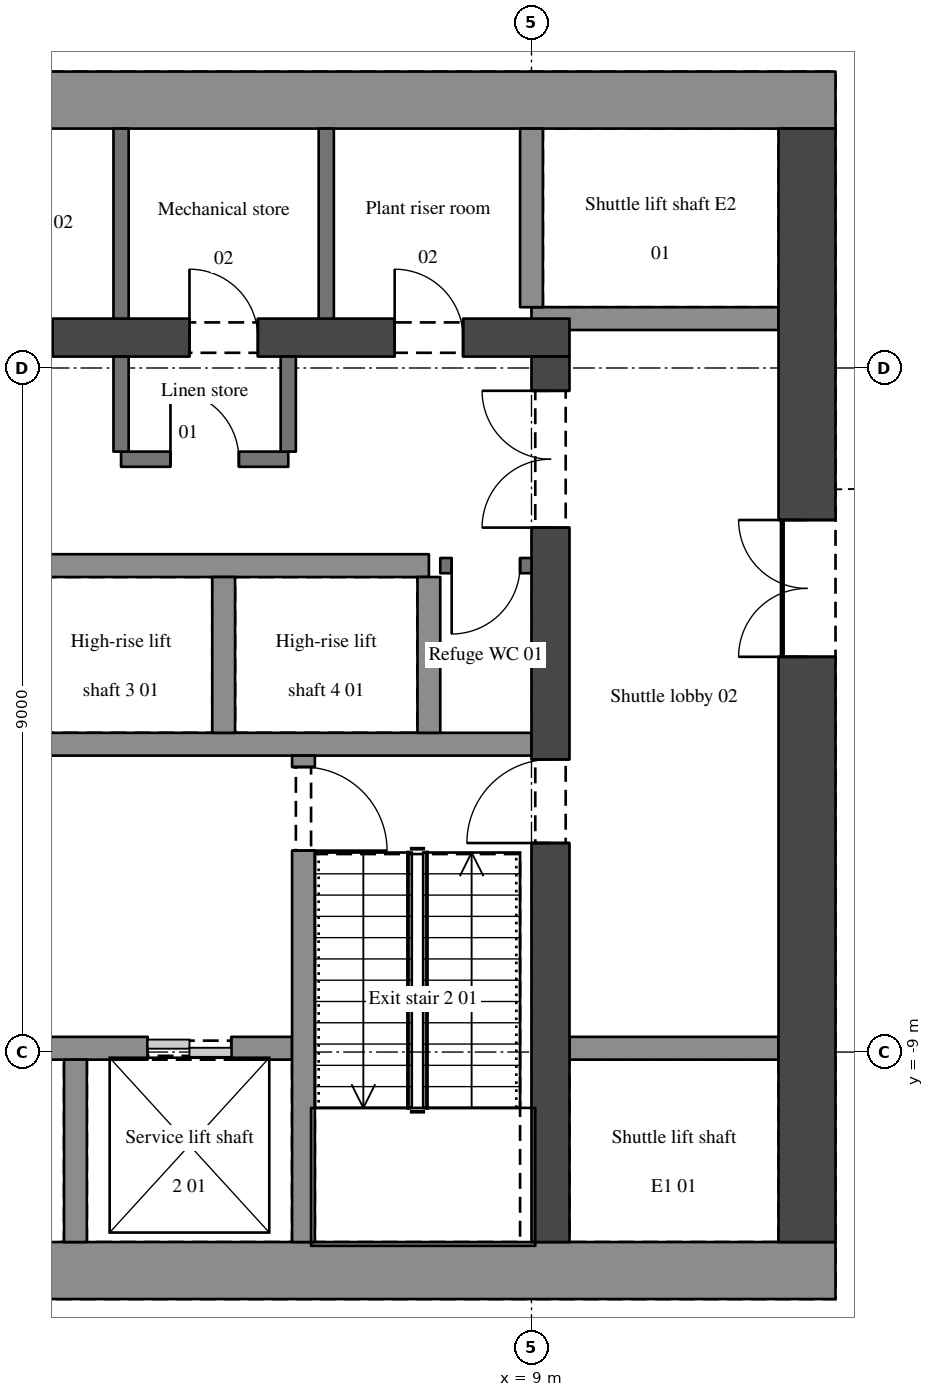
"""IFC4 building model, lengths in metres.
Left out: names, types, materials, properties, quantities, classifications, styles, units other than length and angle.
Written with IfcOpenShell. Run it as: python <this file> out.ifc"""

import sys

from ifc_helpers import new_model, si_unit, direction, frame, frame_2d, origin, place, context, subcontext, project, spatial, rectangle, extrude, element, fill, save


model = new_model("IFC4")
c1 = context("Model", 3, precision=1e-05, world=origin(), true_north=direction((0.0, 1.0)))
c2 = subcontext(c1, "Body", "Model", "MODEL_VIEW")
j1 = project(units=[si_unit("LENGTHUNIT", "METRE"), si_unit("PLANEANGLEUNIT", "RADIAN")], contexts=[c1])
p1 = place(None, origin())
s1 = spatial("IfcSite", under=j1, at=p1, CompositionType="ELEMENT")
p2 = place(p1, origin())
s2 = spatial("IfcBuilding", under=s1, at=p2, CompositionType="ELEMENT")
p3 = place(p2, frame((0.0, 0.0, 167.7)))
s3 = spatial("IfcBuildingStorey", under=s2, at=p3, CompositionType="ELEMENT", Elevation=167.7)
for number, where, z_axis, x_axis in (
    (1, (-13.0, -11.875, 0.0), (0.0, 0.0, 1.0), (1.0, 0.0, 0.0)),
    (2, (-13.0, 3.525, 0.0), (0.0, 0.0, 1.0), (1.0, 0.0, 0.0)),
):
    element("IfcWall", number, at=place(p3, frame(where, z_axis=z_axis, x_axis=x_axis)), inside=s3, PredefinedType="SHEAR", context=c2, shape_type="SweptSolid", body=[
        extrude(rectangle(XDim=26.0, YDim=0.75, at=frame_2d((13.0, 0.0))), origin(), (0.0, 0.0, 1.0), 4.5),
    ])
p4 = place(p3, frame((12.625, -11.5, 0.0), z_axis=(0.0, 0.0, 1.0), x_axis=(0.0, 1.0, 0.0)))
e3 = element("IfcWall", 3, at=p4, inside=s3, PredefinedType="SHEAR", context=c2, shape_type="SweptSolid", body=[
    extrude(rectangle(XDim=14.65, YDim=0.75, at=frame_2d((7.325, 0.0))), origin(), (0.0, 0.0, 1.0), 4.5),
])
p5 = place(p4, frame((7.7, 0.0, 0.0)))
e4 = element("IfcOpeningElement", 4, at=p5, cuts=e3, PredefinedType="OPENING", context=c2, shape_type="SweptSolid", body=[
    extrude(rectangle(XDim=1.8, YDim=2.1, at=frame_2d((0.9, 1.05))), frame((0.0, 0.385, 0.0), z_axis=(0.0, -1.0, 0.0), x_axis=(1.0, 0.0, 0.0)), (0.0, 0.0, 1.0), 0.77),
])
p6 = place(p3, frame((-9.5, 0.4, 0.0), z_axis=(0.0, 0.0, 1.0), x_axis=(1.0, 0.0, 0.0)))
e5 = element("IfcWall", 5, at=p6, inside=s3, PredefinedType="SHEAR", context=c2, shape_type="SweptSolid", body=[
    extrude(rectangle(XDim=19.0, YDim=0.5, at=frame_2d((9.5, 0.0))), origin(), (0.0, 0.0, 1.0), 4.5),
])
p7 = place(p6, frame((1.4, 0.0, 0.0)))
e6 = element("IfcOpeningElement", 6, at=p7, cuts=e5, PredefinedType="OPENING", context=c2, shape_type="SweptSolid", body=[
    extrude(rectangle(XDim=0.9, YDim=2.1, at=frame_2d((0.45, 1.05))), frame((0.0, 0.26, 0.0), z_axis=(0.0, -1.0, 0.0), x_axis=(1.0, 0.0, 0.0)), (0.0, 0.0, 1.0), 0.52),
])
p8 = place(p6, frame((4.1, 0.0, 0.0)))
e7 = element("IfcOpeningElement", 7, at=p8, cuts=e5, PredefinedType="OPENING", context=c2, shape_type="SweptSolid", body=[
    extrude(rectangle(XDim=0.9, YDim=2.1, at=frame_2d((0.45, 1.05))), frame((0.0, 0.26, 0.0), z_axis=(0.0, -1.0, 0.0), x_axis=(1.0, 0.0, 0.0)), (0.0, 0.0, 1.0), 0.52),
])
p9 = place(p6, frame((6.8, 0.0, 0.0)))
e8 = element("IfcOpeningElement", 8, at=p9, cuts=e5, PredefinedType="OPENING", context=c2, shape_type="SweptSolid", body=[
    extrude(rectangle(XDim=0.9, YDim=2.1, at=frame_2d((0.45, 1.05))), frame((0.0, 0.26, 0.0), z_axis=(0.0, -1.0, 0.0), x_axis=(1.0, 0.0, 0.0)), (0.0, 0.0, 1.0), 0.52),
])
p10 = place(p6, frame((11.3, 0.0, 0.0)))
e9 = element("IfcOpeningElement", 9, at=p10, cuts=e5, PredefinedType="OPENING", context=c2, shape_type="SweptSolid", body=[
    extrude(rectangle(XDim=0.9, YDim=2.1, at=frame_2d((0.45, 1.05))), frame((0.0, 0.26, 0.0), z_axis=(0.0, -1.0, 0.0), x_axis=(1.0, 0.0, 0.0)), (0.0, 0.0, 1.0), 0.52),
])
p11 = place(p6, frame((14.0, 0.0, 0.0)))
e10 = element("IfcOpeningElement", 10, at=p11, cuts=e5, PredefinedType="OPENING", context=c2, shape_type="SweptSolid", body=[
    extrude(rectangle(XDim=0.9, YDim=2.1, at=frame_2d((0.45, 1.05))), frame((0.0, 0.26, 0.0), z_axis=(0.0, -1.0, 0.0), x_axis=(1.0, 0.0, 0.0)), (0.0, 0.0, 1.0), 0.52),
])
p12 = place(p6, frame((16.7, 0.0, 0.0)))
e11 = element("IfcOpeningElement", 11, at=p12, cuts=e5, PredefinedType="OPENING", context=c2, shape_type="SweptSolid", body=[
    extrude(rectangle(XDim=0.9, YDim=2.1, at=frame_2d((0.45, 1.05))), frame((0.0, 0.26, 0.0), z_axis=(0.0, -1.0, 0.0), x_axis=(1.0, 0.0, 0.0)), (0.0, 0.0, 1.0), 0.52),
])
p13 = place(p6, frame((9.05, 0.0, 0.0)))
e12 = element("IfcOpeningElement", 12, at=p13, cuts=e5, PredefinedType="OPENING", context=c2, shape_type="SweptSolid", body=[
    extrude(rectangle(XDim=0.9, YDim=2.1, at=frame_2d((0.45, 1.05))), frame((0.0, 0.26, 0.0), z_axis=(0.0, -1.0, 0.0), x_axis=(1.0, 0.0, 0.0)), (0.0, 0.0, 1.0), 0.52),
])
p14 = place(p3, frame((9.25, -11.5, 0.0), z_axis=(0.0, 0.0, 1.0), x_axis=(0.0, 1.0, 0.0)))
e13 = element("IfcWall", 13, at=p14, inside=s3, PredefinedType="SHEAR", context=c2, shape_type="SweptSolid", body=[
    extrude(rectangle(XDim=11.65, YDim=0.5, at=frame_2d((5.825, 0.0))), origin(), (0.0, 0.0, 1.0), 4.5),
])
p15 = place(p14, frame((9.4, 0.0, 0.0)))
e14 = element("IfcOpeningElement", 14, at=p15, cuts=e13, PredefinedType="OPENING", context=c2, shape_type="SweptSolid", body=[
    extrude(rectangle(XDim=1.8, YDim=2.1, at=frame_2d((0.9, 1.05))), frame((0.0, 0.26, 0.0), z_axis=(0.0, -1.0, 0.0), x_axis=(1.0, 0.0, 0.0)), (0.0, 0.0, 1.0), 0.52),
])
p16 = place(p14, frame((5.25, 0.0, 0.0)))
e15 = element("IfcOpeningElement", 15, at=p16, cuts=e13, PredefinedType="OPENING", context=c2, shape_type="SweptSolid", body=[
    extrude(rectangle(XDim=1.1, YDim=2.1, at=frame_2d((0.55, 1.05))), frame((0.0, 0.26, 0.0), z_axis=(0.0, -1.0, 0.0), x_axis=(1.0, 0.0, 0.0)), (0.0, 0.0, 1.0), 0.52),
])
p17 = place(p3, frame((-5.85, -8.95, 0.0), z_axis=(0.0, 0.0, 1.0), x_axis=(1.0, 0.0, 0.0)))
e16 = element("IfcWall", 16, at=p17, inside=s3, PredefinedType="SHEAR", context=c2, shape_type="SweptSolid", body=[
    extrude(rectangle(XDim=11.7, YDim=0.3, at=frame_2d((5.85, 0.0))), origin(), (0.0, 0.0, 1.0), 4.5),
])
p18 = place(p17, frame((0.8, 0.0, 0.0)))
e17 = element("IfcOpeningElement", 17, at=p18, cuts=e16, PredefinedType="OPENING", context=c2, shape_type="SweptSolid", body=[
    extrude(rectangle(XDim=1.1, YDim=2.1, at=frame_2d((0.55, 1.05))), frame((0.0, 0.16, 0.0), z_axis=(0.0, -1.0, 0.0), x_axis=(1.0, 0.0, 0.0)), (0.0, 0.0, 1.0), 0.32),
])
p19 = place(p17, frame((3.8, 0.0, 0.0)))
e18 = element("IfcOpeningElement", 18, at=p19, cuts=e16, PredefinedType="OPENING", context=c2, shape_type="SweptSolid", body=[
    extrude(rectangle(XDim=1.1, YDim=2.1, at=frame_2d((0.55, 1.05))), frame((0.0, 0.16, 0.0), z_axis=(0.0, -1.0, 0.0), x_axis=(1.0, 0.0, 0.0)), (0.0, 0.0, 1.0), 0.32),
])
p20 = place(p17, frame((6.8, 0.0, 0.0)))
e19 = element("IfcOpeningElement", 19, at=p20, cuts=e16, PredefinedType="OPENING", context=c2, shape_type="SweptSolid", body=[
    extrude(rectangle(XDim=1.1, YDim=2.1, at=frame_2d((0.55, 1.05))), frame((0.0, 0.16, 0.0), z_axis=(0.0, -1.0, 0.0), x_axis=(1.0, 0.0, 0.0)), (0.0, 0.0, 1.0), 0.32),
])
p21 = place(p17, frame((9.8, 0.0, 0.0)))
e20 = element("IfcOpeningElement", 20, at=p21, cuts=e16, PredefinedType="OPENING", context=c2, shape_type="SweptSolid", body=[
    extrude(rectangle(XDim=1.1, YDim=2.1, at=frame_2d((0.55, 1.05))), frame((0.0, 0.16, 0.0), z_axis=(0.0, -1.0, 0.0), x_axis=(1.0, 0.0, 0.0)), (0.0, 0.0, 1.0), 0.32),
])
p22 = place(p3, frame((9.5, -8.95, 0.0), z_axis=(0.0, 0.0, 1.0), x_axis=(1.0, 0.0, 0.0)))
e21 = element("IfcWall", 21, at=p22, inside=s3, PredefinedType="SHEAR", context=c2, shape_type="SweptSolid", body=[
    extrude(rectangle(XDim=2.75, YDim=0.3, at=frame_2d((1.375, 0.0))), origin(), (0.0, 0.0, 1.0), 4.5),
])
p23 = place(p3, frame((2.25, -4.95, 0.0), z_axis=(0.0, 0.0, 1.0), x_axis=(1.0, 0.0, 0.0)))
e22 = element("IfcWall", 22, at=p23, inside=s3, PredefinedType="SHEAR", context=c2, shape_type="SweptSolid", body=[
    extrude(rectangle(XDim=6.75, YDim=0.3, at=frame_2d((3.375, 0.0))), origin(), (0.0, 0.0, 1.0), 4.5),
])
p24 = place(p3, frame((2.25, -2.6, 0.0), z_axis=(0.0, 0.0, 1.0), x_axis=(1.0, 0.0, 0.0)))
e23 = element("IfcWall", 23, at=p24, inside=s3, PredefinedType="SHEAR", context=c2, shape_type="SweptSolid", body=[
    extrude(rectangle(XDim=5.4, YDim=0.3, at=frame_2d((2.7, 0.0))), origin(), (0.0, 0.0, 1.0), 4.5),
])
p25 = place(p3, frame((9.0, -2.6, 0.0), z_axis=(0.0, 0.0, 1.0), x_axis=(-1.0, 0.0, 0.0)))
e24 = element("IfcWall", 24, at=p25, inside=s3, PredefinedType="SOLIDWALL", context=c2, shape_type="SweptSolid", body=[
    extrude(rectangle(XDim=1.2, YDim=0.2, at=frame_2d((0.6, 0.0))), origin(), (0.0, 0.0, 1.0), 4.2),
])
p26 = place(p25, frame((0.15, 0.0, 0.0)))
e25 = element("IfcOpeningElement", 25, at=p26, cuts=e24, PredefinedType="OPENING", context=c2, shape_type="SweptSolid", body=[
    extrude(rectangle(XDim=0.9, YDim=2.1, at=frame_2d((0.45, 1.05))), frame((0.0, 0.11, 0.0), z_axis=(0.0, -1.0, 0.0), x_axis=(1.0, 0.0, 0.0)), (0.0, 0.0, 1.0), 0.22),
])
p27 = place(p3, frame((3.6, -1.2, 0.0), z_axis=(0.0, 0.0, 1.0), x_axis=(1.0, 0.0, 0.0)))
e26 = element("IfcWall", 26, at=p27, inside=s3, PredefinedType="SOLIDWALL", context=c2, shape_type="SweptSolid", body=[
    extrude(rectangle(XDim=2.2, YDim=0.2, at=frame_2d((1.1, 0.0))), origin(), (0.0, 0.0, 1.0), 4.2),
])
p28 = place(p27, frame((0.65, 0.0, 0.0)))
e27 = element("IfcOpeningElement", 27, at=p28, cuts=e26, PredefinedType="OPENING", context=c2, shape_type="SweptSolid", body=[
    extrude(rectangle(XDim=0.9, YDim=2.1, at=frame_2d((0.45, 1.05))), frame((0.0, 0.11, 0.0), z_axis=(0.0, -1.0, 0.0), x_axis=(1.0, 0.0, 0.0)), (0.0, 0.0, 1.0), 0.22),
])
p29 = place(p3, frame((12.25, 0.65, 0.0), z_axis=(0.0, 0.0, 1.0), x_axis=(-1.0, 0.0, 0.0)))
e28 = element("IfcWall", 28, at=p29, inside=s3, PredefinedType="SHEAR", context=c2, shape_type="SweptSolid", body=[
    extrude(rectangle(XDim=3.25, YDim=0.3, at=frame_2d((1.625, 0.0))), origin(), (0.0, 0.0, 1.0), 4.5),
])
p30 = place(p3, frame((3.0, -11.5, 0.0), z_axis=(0.0, 0.0, 1.0), x_axis=(0.0, 1.0, 0.0)))
e29 = element("IfcWall", 29, at=p30, inside=s3, PredefinedType="SHEAR", context=c2, shape_type="SweptSolid", body=[
    extrude(rectangle(XDim=2.4, YDim=0.3, at=frame_2d((1.2, 0.0))), origin(), (0.0, 0.0, 1.0), 4.5),
])
p31 = place(p3, frame((3.6, -1.1, 0.0), z_axis=(0.0, 0.0, 1.0), x_axis=(0.0, 1.0, 0.0)))
e30 = element("IfcWall", 30, at=p31, inside=s3, PredefinedType="SOLIDWALL", context=c2, shape_type="SweptSolid", body=[
    extrude(rectangle(XDim=1.25, YDim=0.2, at=frame_2d((0.625, 0.0))), origin(), (0.0, 0.0, 1.0), 4.2),
])
p32 = place(p3, frame((3.6, 0.65, 0.0), z_axis=(0.0, 0.0, 1.0), x_axis=(0.0, 1.0, 0.0)))
e31 = element("IfcWall", 31, at=p32, inside=s3, PredefinedType="SOLIDWALL", context=c2, shape_type="SweptSolid", body=[
    extrude(rectangle(XDim=2.5, YDim=0.2, at=frame_2d((1.25, 0.0))), origin(), (0.0, 0.0, 1.0), 4.2),
])
p33 = place(p3, frame((4.95, -4.8, 0.0), z_axis=(0.0, 0.0, 1.0), x_axis=(0.0, 1.0, 0.0)))
e32 = element("IfcWall", 32, at=p33, inside=s3, PredefinedType="SHEAR", context=c2, shape_type="SweptSolid", body=[
    extrude(rectangle(XDim=2.05, YDim=0.3, at=frame_2d((1.025, 0.0))), origin(), (0.0, 0.0, 1.0), 4.5),
])
p34 = place(p3, frame((5.8, -1.1, 0.0), z_axis=(0.0, 0.0, 1.0), x_axis=(0.0, 1.0, 0.0)))
e33 = element("IfcWall", 33, at=p34, inside=s3, PredefinedType="SOLIDWALL", context=c2, shape_type="SweptSolid", body=[
    extrude(rectangle(XDim=1.25, YDim=0.2, at=frame_2d((0.625, 0.0))), origin(), (0.0, 0.0, 1.0), 4.2),
])
p35 = place(p3, frame((6.0, -5.1, 0.0), z_axis=(0.0, 0.0, 1.0), x_axis=(0.0, -1.0, 0.0)))
e34 = element("IfcWall", 34, at=p35, inside=s3, PredefinedType="SHEAR", context=c2, shape_type="SweptSolid", body=[
    extrude(rectangle(XDim=6.4, YDim=0.3, at=frame_2d((3.2, 0.0))), origin(), (0.0, 0.0, 1.0), 4.5),
])
p36 = place(p35, frame((0.15, 0.0, 0.0)))
e35 = element("IfcOpeningElement", 35, at=p36, cuts=e34, PredefinedType="OPENING", context=c2, shape_type="SweptSolid", body=[
    extrude(rectangle(XDim=1.1, YDim=2.1, at=frame_2d((0.55, 1.05))), frame((0.0, 0.16, 0.0), z_axis=(0.0, -1.0, 0.0), x_axis=(1.0, 0.0, 0.0)), (0.0, 0.0, 1.0), 0.32),
])
p37 = place(p3, frame((6.3, 0.65, 0.0), z_axis=(0.0, 0.0, 1.0), x_axis=(0.0, 1.0, 0.0)))
e36 = element("IfcWall", 36, at=p37, inside=s3, PredefinedType="SOLIDWALL", context=c2, shape_type="SweptSolid", body=[
    extrude(rectangle(XDim=2.5, YDim=0.2, at=frame_2d((1.25, 0.0))), origin(), (0.0, 0.0, 1.0), 4.2),
])
p38 = place(p3, frame((7.65, -4.8, 0.0), z_axis=(0.0, 0.0, 1.0), x_axis=(0.0, 1.0, 0.0)))
e37 = element("IfcWall", 37, at=p38, inside=s3, PredefinedType="SHEAR", context=c2, shape_type="SweptSolid", body=[
    extrude(rectangle(XDim=2.05, YDim=0.3, at=frame_2d((1.025, 0.0))), origin(), (0.0, 0.0, 1.0), 4.5),
])
p39 = place(p3, frame((9.0, 0.8, 0.0), z_axis=(0.0, 0.0, 1.0), x_axis=(0.0, 1.0, 0.0)))
e38 = element("IfcWall", 38, at=p39, inside=s3, PredefinedType="SHEAR", context=c2, shape_type="SweptSolid", body=[
    extrude(rectangle(XDim=2.35, YDim=0.3, at=frame_2d((1.175, 0.0))), origin(), (0.0, 0.0, 1.0), 4.5),
])
p40 = place(p15, origin())
e39 = element("IfcDoor", 39, at=p40, inside=s3, OperationType="DOUBLE_DOOR_SINGLE_SWING", PredefinedType="DOOR", context=c2, shape_type="SweptSolid", body=[
    extrude(rectangle(XDim=1.8, YDim=2.1, at=frame_2d((0.9, 1.05))), frame((0.0, 0.025, 0.0), z_axis=(0.0, -1.0, 0.0), x_axis=(1.0, 0.0, 0.0)), (0.0, 0.0, 1.0), 0.05),
])
fill(e14, e39)
p41 = place(p36, origin())
e40 = element("IfcDoor", 40, at=p41, inside=s3, OperationType="SINGLE_SWING_RIGHT", PredefinedType="DOOR", context=c2, shape_type="SweptSolid", body=[
    extrude(rectangle(XDim=1.1, YDim=2.1, at=frame_2d((0.55, 1.05))), frame((0.0, 0.025, 0.0), z_axis=(0.0, -1.0, 0.0), x_axis=(1.0, 0.0, 0.0)), (0.0, 0.0, 1.0), 0.05),
])
fill(e35, e40)
p42 = place(p16, origin())
e41 = element("IfcDoor", 41, at=p42, inside=s3, OperationType="SINGLE_SWING_LEFT", PredefinedType="DOOR", context=c2, shape_type="SweptSolid", body=[
    extrude(rectangle(XDim=1.1, YDim=2.1, at=frame_2d((0.55, 1.05))), frame((0.0, 0.025, 0.0), z_axis=(0.0, -1.0, 0.0), x_axis=(1.0, 0.0, 0.0)), (0.0, 0.0, 1.0), 0.05),
])
fill(e15, e41)
p43 = place(p26, origin())
e42 = element("IfcDoor", 42, at=p43, inside=s3, OperationType="SINGLE_SWING_RIGHT", PredefinedType="DOOR", context=c2, shape_type="SweptSolid", body=[
    extrude(rectangle(XDim=0.9, YDim=2.1, at=frame_2d((0.45, 1.05))), frame((0.0, 0.025, 0.0), z_axis=(0.0, -1.0, 0.0), x_axis=(1.0, 0.0, 0.0)), (0.0, 0.0, 1.0), 0.05),
])
fill(e25, e42)
p44 = place(p11, origin())
e43 = element("IfcDoor", 43, at=p44, inside=s3, OperationType="SINGLE_SWING_LEFT", PredefinedType="DOOR", context=c2, shape_type="SweptSolid", body=[
    extrude(rectangle(XDim=0.9, YDim=2.1, at=frame_2d((0.45, 1.05))), frame((0.0, 0.025, 0.0), z_axis=(0.0, -1.0, 0.0), x_axis=(1.0, 0.0, 0.0)), (0.0, 0.0, 1.0), 0.05),
])
fill(e10, e43)
p45 = place(p12, origin())
e44 = element("IfcDoor", 44, at=p45, inside=s3, OperationType="SINGLE_SWING_LEFT", PredefinedType="DOOR", context=c2, shape_type="SweptSolid", body=[
    extrude(rectangle(XDim=0.9, YDim=2.1, at=frame_2d((0.45, 1.05))), frame((0.0, 0.025, 0.0), z_axis=(0.0, -1.0, 0.0), x_axis=(1.0, 0.0, 0.0)), (0.0, 0.0, 1.0), 0.05),
])
fill(e11, e44)
p46 = place(p28, origin())
e45 = element("IfcDoor", 45, at=p46, inside=s3, OperationType="SINGLE_SWING_LEFT", PredefinedType="DOOR", context=c2, shape_type="SweptSolid", body=[
    extrude(rectangle(XDim=0.9, YDim=2.1, at=frame_2d((0.45, 1.05))), frame((0.0, 0.025, 0.0), z_axis=(0.0, -1.0, 0.0), x_axis=(1.0, 0.0, 0.0)), (0.0, 0.0, 1.0), 0.05),
])
fill(e27, e45)
p47 = place(p21, origin())
e46 = element("IfcDoor", 46, at=p47, inside=s3, OperationType="DOUBLE_DOOR_SLIDING", PredefinedType="DOOR", context=c2, shape_type="SweptSolid", body=[
    extrude(rectangle(XDim=1.1, YDim=2.1, at=frame_2d((0.55, 1.05))), frame((0.0, 0.025, 0.0), z_axis=(0.0, -1.0, 0.0), x_axis=(1.0, 0.0, 0.0)), (0.0, 0.0, 1.0), 0.05),
])
fill(e20, e46)
p48 = place(p5, origin())
e47 = element("IfcDoor", 47, at=p48, inside=s3, OperationType="DOUBLE_DOOR_SINGLE_SWING", PredefinedType="DOOR", context=c2, shape_type="SweptSolid", body=[
    extrude(rectangle(XDim=1.8, YDim=2.1, at=frame_2d((0.9, 1.05))), frame((0.0, 0.025, 0.0), z_axis=(0.0, -1.0, 0.0), x_axis=(1.0, 0.0, 0.0)), (0.0, 0.0, 1.0), 0.05),
])
fill(e4, e47)
save(model, sys.argv[1])
